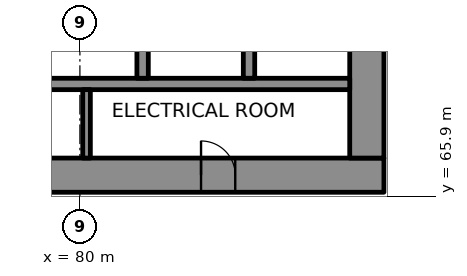
"""IFC4 building model, lengths in metres.
Left out: names, types, materials, properties, quantities, classifications, styles, units other than length and angle.
Written with IfcOpenShell. Run it as: python <this file> out.ifc"""

import sys

from ifc_helpers import new_model, si_unit, direction, frame, frame_2d, origin, place, context, subcontext, project, spatial, rectangle, extrude, element, fill, save


model = new_model("IFC4")
c1 = context("Model", 3, precision=1e-05, world=origin(), true_north=direction((0.0, 1.0)))
c2 = subcontext(c1, "Body", "Model", "MODEL_VIEW")
j1 = project(units=[si_unit("LENGTHUNIT", "METRE"), si_unit("PLANEANGLEUNIT", "RADIAN")], contexts=[c1])
p1 = place(None, origin())
s1 = spatial("IfcSite", under=j1, at=p1, CompositionType="ELEMENT")
p2 = place(p1, origin())
s2 = spatial("IfcBuilding", under=s1, at=p2, CompositionType="ELEMENT")
p3 = place(p2, frame((0.0, 0.0, 52.6)))
s3 = spatial("IfcBuildingStorey", under=s2, at=p3, CompositionType="ELEMENT", Elevation=52.6)
p4 = place(p3, frame((62.0, 66.45, 0.0), z_axis=(0.0, 0.0, 1.0), x_axis=(1.0, 0.0, 0.0)))
e1 = element("IfcWall", 1, at=p4, inside=s3, PredefinedType="SHEAR", context=c2, shape_type="SweptSolid", body=[
    extrude(rectangle(XDim=26.0, YDim=0.9, at=frame_2d((13.0, 0.0))), origin(), (0.0, 0.0, 1.0), 4.0),
])
p5 = place(p4, frame((3.45, 0.0, 0.0)))
e2 = element("IfcOpeningElement", 2, at=p5, cuts=e1, PredefinedType="OPENING", context=c2, shape_type="SweptSolid", body=[
    extrude(rectangle(XDim=0.9, YDim=2.1, at=frame_2d((0.45, 1.05))), frame((0.0, 0.46, 0.0), z_axis=(0.0, -1.0, 0.0), x_axis=(1.0, 0.0, 0.0)), (0.0, 0.0, 1.0), 0.92),
])
p6 = place(p4, frame((6.425, 0.0, 0.0)))
e3 = element("IfcOpeningElement", 3, at=p6, cuts=e1, PredefinedType="OPENING", context=c2, shape_type="SweptSolid", body=[
    extrude(rectangle(XDim=0.9, YDim=2.1, at=frame_2d((0.45, 1.05))), frame((0.0, 0.46, 0.0), z_axis=(0.0, -1.0, 0.0), x_axis=(1.0, 0.0, 0.0)), (0.0, 0.0, 1.0), 0.92),
])
p7 = place(p4, frame((9.4, 0.0, 0.0)))
e4 = element("IfcOpeningElement", 4, at=p7, cuts=e1, PredefinedType="OPENING", context=c2, shape_type="SweptSolid", body=[
    extrude(rectangle(XDim=0.9, YDim=2.1, at=frame_2d((0.45, 1.05))), frame((0.0, 0.46, 0.0), z_axis=(0.0, -1.0, 0.0), x_axis=(1.0, 0.0, 0.0)), (0.0, 0.0, 1.0), 0.92),
])
p8 = place(p4, frame((14.262, 0.0, 0.0)))
e5 = element("IfcOpeningElement", 5, at=p8, cuts=e1, PredefinedType="OPENING", context=c2, shape_type="SweptSolid", body=[
    extrude(rectangle(XDim=0.9, YDim=2.1, at=frame_2d((0.45, 1.05))), frame((0.0, 0.46, 0.0), z_axis=(0.0, -1.0, 0.0), x_axis=(1.0, 0.0, 0.0)), (0.0, 0.0, 1.0), 0.92),
])
p9 = place(p4, frame((21.188, 0.0, 0.0)))
e6 = element("IfcOpeningElement", 6, at=p9, cuts=e1, PredefinedType="OPENING", context=c2, shape_type="SweptSolid", body=[
    extrude(rectangle(XDim=0.9, YDim=2.1, at=frame_2d((0.45, 1.05))), frame((0.0, 0.46, 0.0), z_axis=(0.0, -1.0, 0.0), x_axis=(1.0, 0.0, 0.0)), (0.0, 0.0, 1.0), 0.92),
])
p10 = place(p3, frame((87.55, 66.9, 0.0), z_axis=(0.0, 0.0, 1.0), x_axis=(0.0, 1.0, 0.0)))
e7 = element("IfcWall", 7, at=p10, inside=s3, PredefinedType="SHEAR", context=c2, shape_type="SweptSolid", body=[
    extrude(rectangle(XDim=16.2, YDim=0.9, at=frame_2d((8.1, 0.0))), origin(), (0.0, 0.0, 1.0), 4.0),
])
p11 = place(p10, frame((5.5, 0.0, 0.0)))
e8 = element("IfcOpeningElement", 8, at=p11, cuts=e7, PredefinedType="OPENING", context=c2, shape_type="SweptSolid", body=[
    extrude(rectangle(XDim=1.8, YDim=2.1, at=frame_2d((0.9, 1.05))), frame((0.0, 0.46, 0.0), z_axis=(0.0, -1.0, 0.0), x_axis=(1.0, 0.0, 0.0)), (0.0, 0.0, 1.0), 0.92),
])
p12 = place(p10, frame((11.738, 0.0, 0.0)))
e9 = element("IfcOpeningElement", 9, at=p12, cuts=e7, PredefinedType="OPENING", context=c2, shape_type="SweptSolid", body=[
    extrude(rectangle(XDim=0.9, YDim=2.1, at=frame_2d((0.45, 1.05))), frame((0.0, 0.46, 0.0), z_axis=(0.0, -1.0, 0.0), x_axis=(1.0, 0.0, 0.0)), (0.0, 0.0, 1.0), 0.92),
])
p13 = place(p3, frame((70.35, 68.85, 0.0), z_axis=(0.0, 0.0, 1.0), x_axis=(1.0, 0.0, 0.0)))
e10 = element("IfcWall", 10, at=p13, inside=s3, PredefinedType="SHEAR", context=c2, shape_type="SweptSolid", body=[
    extrude(rectangle(XDim=16.75, YDim=0.3, at=frame_2d((8.375, 0.0))), origin(), (0.0, 0.0, 1.0), 4.0),
])
for number, where, z_axis, x_axis in (
    (11, (81.65, 69.0, 0.0), (0.0, 0.0, 1.0), (0.0, 1.0, 0.0)),
    (12, (84.45, 69.0, 0.0), (0.0, 0.0, 1.0), (0.0, 1.0, 0.0)),
):
    element("IfcWall", number, at=place(p3, frame(where, z_axis=z_axis, x_axis=x_axis)), inside=s3, PredefinedType="SHEAR", context=c2, shape_type="SweptSolid", body=[
        extrude(rectangle(XDim=2.6, YDim=0.3, at=frame_2d((1.3, 0.0))), origin(), (0.0, 0.0, 1.0), 4.0),
    ])
p14 = place(p3, frame((110.994, 61.012, 0.0), z_axis=(0.0, 0.0, 1.0), x_axis=(-0.500000853759, 0.866024910866, 0.0)))
e13 = element("IfcWall", 13, at=p14, inside=s3, PredefinedType="SOLIDWALL", context=c2, shape_type="SweptSolid", body=[
    extrude(rectangle(XDim=60.222, YDim=0.8, at=frame_2d((30.111, 0.0))), origin(), (0.0, 0.0, 1.0), 0.9),
])
p15 = place(p3, frame((80.175, 66.9, 0.0), z_axis=(0.0, 0.0, 1.0), x_axis=(0.0, 1.0, 0.0)))
e14 = element("IfcWall", 14, at=p15, inside=s3, PredefinedType="PARTITIONING", context=c2, shape_type="SweptSolid", body=[
    extrude(rectangle(XDim=1.8, YDim=0.2, at=frame_2d((0.9, 0.0))), origin(), (0.0, 0.0, 1.0), 4.0),
])
p16 = place(p9, origin())
e15 = element("IfcDoor", 15, at=p16, inside=s3, OperationType="SINGLE_SWING_LEFT", PredefinedType="DOOR", context=c2, shape_type="SweptSolid", body=[
    extrude(rectangle(XDim=0.9, YDim=2.1, at=frame_2d((0.45, 1.05))), frame((0.0, 0.17, 0.0), z_axis=(0.0, -1.0, 0.0), x_axis=(1.0, 0.0, 0.0)), (0.0, 0.0, 1.0), 0.34),
])
fill(e6, e15)
save(model, sys.argv[1])
